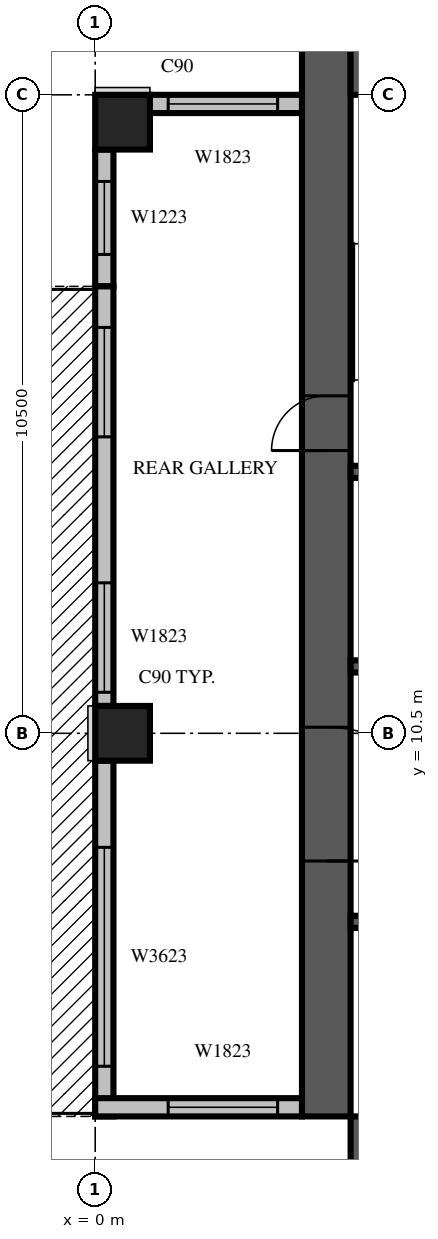
"""IFC4 building model, lengths in metres.
Left out: names, types, materials, properties, quantities, classifications, styles, units other than length and angle.
Written with IfcOpenShell. Run it as: python <this file> out.ifc"""

import sys

from ifc_helpers import new_model, si_unit, direction, frame, frame_2d, origin, origin_2d, place, context, subcontext, project, spatial, rectangle, extrude, source, transform, mapped, element, fill, save


model = new_model("IFC4")
c1 = context("Model", 3, precision=1e-05, world=origin(), true_north=direction((0.0, 1.0)))
c2 = subcontext(c1, "Body", "Model", "MODEL_VIEW")
j1 = project(units=[si_unit("LENGTHUNIT", "METRE"), si_unit("PLANEANGLEUNIT", "RADIAN")], contexts=[c1])
p1 = place(None, origin())
s1 = spatial("IfcSite", under=j1, at=p1, CompositionType="ELEMENT")
p2 = place(p1, origin())
s2 = spatial("IfcBuilding", under=s1, at=p2, CompositionType="ELEMENT")
p3 = place(p2, frame((0.0, 0.0, 193.0)))
s3 = spatial("IfcBuildingStorey", under=s2, at=p3, CompositionType="ELEMENT", Elevation=193.0)
m1 = source(origin(), c2, "Body", "SweptSolid", [
    extrude(rectangle(XDim=0.9, YDim=0.9, at=origin_2d()), origin(), (0.0, 0.0, 1.0), 3.8),
])
for number, where, z_axis, x_axis in (
    (1, (0.45, 10.5, 0.0), (0.0, 0.0, 1.0), (1.0, 0.0, 0.0)),
    (2, (0.45, 20.55, 0.0), (0.0, 0.0, 1.0), (1.0, 0.0, 0.0)),
):
    element("IfcColumn", number, at=place(p3, frame(where, z_axis=z_axis, x_axis=x_axis)), inside=s3, PredefinedType="COLUMN", context=c2, shape_type="MappedRepresentation", body=[
        mapped(m1, transform((0.0, 0.0, 0.0), scale=1.0)),
    ])
m2 = source(origin(), c2, "Body", "SweptSolid", [
    extrude(rectangle(XDim=17.6, YDim=0.8, at=frame_2d((8.8, 0.0))), origin(), (0.0, 0.0, 1.0), 3.8),
])
p4 = place(p3, frame((3.8, 4.2, 0.0), z_axis=(0.0, 0.0, 1.0), x_axis=(0.0, 1.0, 0.0)))
e3 = element("IfcWall", 3, at=p4, inside=s3, PredefinedType="SHEAR", context=c2, shape_type="MappedRepresentation", body=[
    mapped(m2, transform((0.0, 0.0, 0.0), scale=1.0)),
])
m3 = source(origin(), c2, "Body", "SweptSolid", [
    extrude(rectangle(XDim=2.2, YDim=2.1, at=frame_2d((1.1, 1.05))), frame((0.0, 0.41, 0.0), z_axis=(0.0, -1.0, 0.0), x_axis=(1.0, 0.0, 0.0)), (0.0, 0.0, 1.0), 0.82),
])
p5 = place(p4, frame((4.2, 0.0, 0.0)))
e4 = element("IfcOpeningElement", 4, at=p5, cuts=e3, PredefinedType="OPENING", context=c2, shape_type="MappedRepresentation", body=[
    mapped(m3, transform((0.0, 0.0, 0.0), scale=1.0)),
])
m4 = source(origin(), c2, "Body", "SweptSolid", [
    extrude(rectangle(XDim=0.9, YDim=2.1, at=frame_2d((0.45, 1.05))), frame((0.0, 0.41, 0.0), z_axis=(0.0, -1.0, 0.0), x_axis=(1.0, 0.0, 0.0)), (0.0, 0.0, 1.0), 0.82),
])
p6 = place(p4, frame((10.95, 0.0, 0.0)))
e5 = element("IfcOpeningElement", 5, at=p6, cuts=e3, PredefinedType="OPENING", context=c2, shape_type="MappedRepresentation", body=[
    mapped(m4, transform((0.0, 0.0, 0.0), scale=1.0)),
])
p7 = place(p3, frame((4.2, 3.8, 0.0), z_axis=(0.0, 0.0, 1.0), x_axis=(1.0, 0.0, 0.0)))
e6 = element("IfcWall", 6, at=p7, inside=s3, PredefinedType="SHEAR", context=c2, shape_type="MappedRepresentation", body=[
    mapped(m2, transform((0.0, 0.0, 0.0), scale=1.0)),
])
p8 = place(p7, frame((12.75, 0.0, 0.0)))
e7 = element("IfcOpeningElement", 7, at=p8, cuts=e6, PredefinedType="OPENING", context=c2, shape_type="MappedRepresentation", body=[
    mapped(m4, transform((0.0, 0.0, 0.0), scale=1.0)),
])
m5 = source(origin(), c2, "Body", "SweptSolid", [
    extrude(rectangle(XDim=16.8, YDim=0.8, at=frame_2d((8.4, 0.0))), origin(), (0.0, 0.0, 1.0), 3.8),
])
p9 = place(p3, frame((4.2, 21.4, 0.0), z_axis=(0.0, 0.0, 1.0), x_axis=(1.0, 0.0, 0.0)))
e8 = element("IfcWall", 8, at=p9, inside=s3, PredefinedType="SHEAR", context=c2, shape_type="MappedRepresentation", body=[
    mapped(m5, transform((0.0, 0.0, 0.0), scale=1.0)),
])
m6 = source(origin(), c2, "Body", "SweptSolid", [
    extrude(rectangle(XDim=1.2, YDim=2.1, at=frame_2d((0.6, 1.05))), frame((0.0, 0.41, 0.0), z_axis=(0.0, -1.0, 0.0), x_axis=(1.0, 0.0, 0.0)), (0.0, 0.0, 1.0), 0.82),
])
p10 = place(p9, frame((7.4, 0.0, 0.0)))
e9 = element("IfcOpeningElement", 9, at=p10, cuts=e8, PredefinedType="OPENING", context=c2, shape_type="MappedRepresentation", body=[
    mapped(m6, transform((0.0, 0.0, 0.0), scale=1.0)),
])
m7 = source(origin(), c2, "Body", "SweptSolid", [
    extrude(rectangle(XDim=2.5, YDim=0.3, at=frame_2d((1.25, 0.0))), origin(), (0.0, 0.0, 1.0), 3.4),
])
p11 = place(p3, frame((3.4, 20.85, 0.0), z_axis=(0.0, 0.0, 1.0), x_axis=(-1.0, 0.0, 0.0)))
e10 = element("IfcWall", 10, at=p11, inside=s3, PredefinedType="STANDARD", context=c2, shape_type="MappedRepresentation", body=[
    mapped(m7, transform((0.0, 0.0, 0.0), scale=1.0)),
])
m8 = source(origin(), c2, "Body", "SweptSolid", [
    extrude(rectangle(XDim=1.8, YDim=2.3, at=frame_2d((0.9, 1.15))), frame((0.0, 0.16, 0.0), z_axis=(0.0, -1.0, 0.0), x_axis=(1.0, 0.0, 0.0)), (0.0, 0.0, 1.0), 0.32),
])
p12 = place(p11, frame((0.4, 0.0, 0.6)))
e11 = element("IfcOpeningElement", 11, at=p12, cuts=e10, PredefinedType="OPENING", context=c2, shape_type="MappedRepresentation", body=[
    mapped(m8, transform((0.0, 0.0, 0.0), scale=1.0)),
])
m9 = source(origin(), c2, "Body", "SweptSolid", [
    extrude(rectangle(XDim=2.25, YDim=0.3, at=frame_2d((1.125, 0.0))), origin(), (0.0, 0.0, 1.0), 3.4),
])
p13 = place(p3, frame((0.15, 20.1, 0.0), z_axis=(0.0, 0.0, 1.0), x_axis=(0.0, -1.0, 0.0)))
e12 = element("IfcWall", 12, at=p13, inside=s3, PredefinedType="STANDARD", context=c2, shape_type="MappedRepresentation", body=[
    mapped(m9, transform((0.0, 0.0, 0.0), scale=1.0)),
])
m10 = source(origin(), c2, "Body", "SweptSolid", [
    extrude(rectangle(XDim=1.2, YDim=2.3, at=frame_2d((0.6, 1.15))), frame((0.0, 0.16, 0.0), z_axis=(0.0, -1.0, 0.0), x_axis=(1.0, 0.0, 0.0)), (0.0, 0.0, 1.0), 0.32),
])
p14 = place(p13, frame((0.525, 0.0, 0.6)))
e13 = element("IfcOpeningElement", 13, at=p14, cuts=e12, PredefinedType="OPENING", context=c2, shape_type="MappedRepresentation", body=[
    mapped(m10, transform((0.0, 0.0, 0.0), scale=1.0)),
])
m11 = source(origin(), c2, "Body", "SweptSolid", [
    extrude(rectangle(XDim=6.9, YDim=0.3, at=frame_2d((3.45, 0.0))), origin(), (0.0, 0.0, 1.0), 3.4),
])
p15 = place(p3, frame((0.15, 17.85, 0.0), z_axis=(0.0, 0.0, 1.0), x_axis=(0.0, -1.0, 0.0)))
e14 = element("IfcWall", 14, at=p15, inside=s3, PredefinedType="STANDARD", context=c2, shape_type="MappedRepresentation", body=[
    mapped(m11, transform((0.0, 0.0, 0.0), scale=1.0)),
])
m12 = source(origin(), c2, "Body", "SweptSolid", [
    extrude(rectangle(XDim=1.8, YDim=2.4, at=frame_2d((0.9, 1.2))), frame((0.0, 0.16, 0.0), z_axis=(0.0, -1.0, 0.0), x_axis=(1.0, 0.0, 0.0)), (0.0, 0.0, 1.0), 0.32),
])
p16 = place(p15, frame((0.675, 0.0, 0.0)))
e15 = element("IfcOpeningElement", 15, at=p16, cuts=e14, PredefinedType="OPENING", context=c2, shape_type="MappedRepresentation", body=[
    mapped(m12, transform((0.0, 0.0, 0.0), scale=1.0)),
])
p17 = place(p15, frame((4.875, 0.0, 0.6)))
e16 = element("IfcOpeningElement", 16, at=p17, cuts=e14, PredefinedType="OPENING", context=c2, shape_type="MappedRepresentation", body=[
    mapped(m8, transform((0.0, 0.0, 0.0), scale=1.0)),
])
m13 = source(origin(), c2, "Body", "SweptSolid", [
    extrude(rectangle(XDim=5.85, YDim=0.3, at=frame_2d((2.925, 0.0))), origin(), (0.0, 0.0, 1.0), 3.4),
])
p18 = place(p3, frame((0.15, 10.05, 0.0), z_axis=(0.0, 0.0, 1.0), x_axis=(0.0, -1.0, 0.0)))
e17 = element("IfcWall", 17, at=p18, inside=s3, PredefinedType="STANDARD", context=c2, shape_type="MappedRepresentation", body=[
    mapped(m13, transform((0.0, 0.0, 0.0), scale=1.0)),
])
m14 = source(origin(), c2, "Body", "SweptSolid", [
    extrude(rectangle(XDim=3.6, YDim=2.3, at=frame_2d((1.8, 1.15))), frame((0.0, 0.16, 0.0), z_axis=(0.0, -1.0, 0.0), x_axis=(1.0, 0.0, 0.0)), (0.0, 0.0, 1.0), 0.32),
])
p19 = place(p18, frame((1.425, 0.0, 0.6)))
e18 = element("IfcOpeningElement", 18, at=p19, cuts=e17, PredefinedType="OPENING", context=c2, shape_type="MappedRepresentation", body=[
    mapped(m14, transform((0.0, 0.0, 0.0), scale=1.0)),
])
m15 = source(origin(), c2, "Body", "SweptSolid", [
    extrude(rectangle(XDim=3.4, YDim=0.3, at=frame_2d((1.7, 0.0))), origin(), (0.0, 0.0, 1.0), 3.4),
])
p20 = place(p3, frame((0.0, 4.35, 0.0), z_axis=(0.0, 0.0, 1.0), x_axis=(1.0, 0.0, 0.0)))
e19 = element("IfcWall", 19, at=p20, inside=s3, PredefinedType="STANDARD", context=c2, shape_type="MappedRepresentation", body=[
    mapped(m15, transform((0.0, 0.0, 0.0), scale=1.0)),
])
p21 = place(p20, frame((1.2, 0.0, 0.6)))
e20 = element("IfcOpeningElement", 20, at=p21, cuts=e19, PredefinedType="OPENING", context=c2, shape_type="MappedRepresentation", body=[
    mapped(m8, transform((0.0, 0.0, 0.0), scale=1.0)),
])
m16 = source(origin(), c2, "Body", "SweptSolid", [
    extrude(rectangle(XDim=9.6, YDim=0.2, at=frame_2d((4.8, 0.0))), origin(), (0.0, 0.0, 1.0), 3.8),
])
p22 = place(p3, frame((4.2, 7.4, 0.0), z_axis=(0.0, 0.0, 1.0), x_axis=(1.0, 0.0, 0.0)))
e21 = element("IfcWall", 21, at=p22, inside=s3, PredefinedType="SOLIDWALL", context=c2, shape_type="MappedRepresentation", body=[
    mapped(m16, transform((0.0, 0.0, 0.0), scale=1.0)),
])
m17 = source(origin(), c2, "Body", "SweptSolid", [
    extrude(rectangle(XDim=1.1, YDim=2.1, at=frame_2d((0.55, 1.05))), frame((0.0, 0.11, 0.0), z_axis=(0.0, -1.0, 0.0), x_axis=(1.0, 0.0, 0.0)), (0.0, 0.0, 1.0), 0.22),
])
p23 = place(p22, frame((0.65, 0.0, 0.0)))
e22 = element("IfcOpeningElement", 22, at=p23, cuts=e21, PredefinedType="OPENING", context=c2, shape_type="MappedRepresentation", body=[
    mapped(m17, transform((0.0, 0.0, 0.0), scale=1.0)),
])
p24 = place(p22, frame((3.05, 0.0, 0.0)))
e23 = element("IfcOpeningElement", 23, at=p24, cuts=e21, PredefinedType="OPENING", context=c2, shape_type="MappedRepresentation", body=[
    mapped(m17, transform((0.0, 0.0, 0.0), scale=1.0)),
])
p25 = place(p22, frame((5.45, 0.0, 0.0)))
e24 = element("IfcOpeningElement", 24, at=p25, cuts=e21, PredefinedType="OPENING", context=c2, shape_type="MappedRepresentation", body=[
    mapped(m17, transform((0.0, 0.0, 0.0), scale=1.0)),
])
p26 = place(p22, frame((7.85, 0.0, 0.0)))
e25 = element("IfcOpeningElement", 25, at=p26, cuts=e21, PredefinedType="OPENING", context=c2, shape_type="MappedRepresentation", body=[
    mapped(m17, transform((0.0, 0.0, 0.0), scale=1.0)),
])
m18 = source(origin(), c2, "Body", "SweptSolid", [
    extrude(rectangle(XDim=4.8, YDim=0.2, at=frame_2d((2.4, 0.0))), origin(), (0.0, 0.0, 1.0), 3.8),
])
p27 = place(p3, frame((4.2, 11.6, 0.0), z_axis=(0.0, 0.0, 1.0), x_axis=(1.0, 0.0, 0.0)))
e26 = element("IfcWall", 26, at=p27, inside=s3, PredefinedType="SOLIDWALL", context=c2, shape_type="MappedRepresentation", body=[
    mapped(m18, transform((0.0, 0.0, 0.0), scale=1.0)),
])
p28 = place(p27, frame((0.65, 0.0, 0.0)))
e27 = element("IfcOpeningElement", 27, at=p28, cuts=e26, PredefinedType="OPENING", context=c2, shape_type="MappedRepresentation", body=[
    mapped(m17, transform((0.0, 0.0, 0.0), scale=1.0)),
])
p29 = place(p27, frame((3.05, 0.0, 0.0)))
e28 = element("IfcOpeningElement", 28, at=p29, cuts=e26, PredefinedType="OPENING", context=c2, shape_type="MappedRepresentation", body=[
    mapped(m17, transform((0.0, 0.0, 0.0), scale=1.0)),
])
p30 = place(p3, frame((4.2, 14.8, 0.0), z_axis=(0.0, 0.0, 1.0), x_axis=(1.0, 0.0, 0.0)))
e29 = element("IfcWall", 29, at=p30, inside=s3, PredefinedType="SOLIDWALL", context=c2, shape_type="MappedRepresentation", body=[
    mapped(m18, transform((0.0, 0.0, 0.0), scale=1.0)),
])
m19 = source(origin(), c2, "Body", "SweptSolid", [
    extrude(rectangle(XDim=1.8, YDim=2.3, at=frame_2d((0.9, 1.15))), frame((0.0, 0.03, 0.0), z_axis=(0.0, -1.0, 0.0), x_axis=(1.0, 0.0, 0.0)), (0.0, 0.0, 1.0), 0.06),
])
p31 = place(p12, origin())
e30 = element("IfcWindow", 30, at=p31, inside=s3, PartitioningType="SINGLE_PANEL", PredefinedType="WINDOW", context=c2, shape_type="MappedRepresentation", body=[
    mapped(m19, transform((0.0, 0.0, 0.0), scale=1.0)),
])
fill(e11, e30)
m20 = source(origin(), c2, "Body", "SweptSolid", [
    extrude(rectangle(XDim=1.2, YDim=2.3, at=frame_2d((0.6, 1.15))), frame((0.0, 0.03, 0.0), z_axis=(0.0, -1.0, 0.0), x_axis=(1.0, 0.0, 0.0)), (0.0, 0.0, 1.0), 0.06),
])
p32 = place(p14, origin())
e31 = element("IfcWindow", 31, at=p32, inside=s3, PartitioningType="SINGLE_PANEL", PredefinedType="WINDOW", context=c2, shape_type="MappedRepresentation", body=[
    mapped(m20, transform((0.0, 0.0, 0.0), scale=1.0)),
])
fill(e13, e31)
m21 = source(origin(), c2, "Body", "SweptSolid", [
    extrude(rectangle(XDim=1.8, YDim=2.4, at=frame_2d((0.9, 1.2))), frame((0.0, 0.025, 0.0), z_axis=(0.0, -1.0, 0.0), x_axis=(1.0, 0.0, 0.0)), (0.0, 0.0, 1.0), 0.05),
])
p33 = place(p16, origin())
e32 = element("IfcDoor", 32, at=p33, inside=s3, OperationType="SLIDING_TO_LEFT", PredefinedType="DOOR", context=c2, shape_type="MappedRepresentation", body=[
    mapped(m21, transform((0.0, 0.0, 0.0), scale=1.0)),
])
fill(e15, e32)
p34 = place(p17, origin())
e33 = element("IfcWindow", 33, at=p34, inside=s3, PartitioningType="SINGLE_PANEL", PredefinedType="WINDOW", context=c2, shape_type="MappedRepresentation", body=[
    mapped(m19, transform((0.0, 0.0, 0.0), scale=1.0)),
])
fill(e16, e33)
m22 = source(origin(), c2, "Body", "SweptSolid", [
    extrude(rectangle(XDim=3.6, YDim=2.3, at=frame_2d((1.8, 1.15))), frame((0.0, 0.03, 0.0), z_axis=(0.0, -1.0, 0.0), x_axis=(1.0, 0.0, 0.0)), (0.0, 0.0, 1.0), 0.06),
])
p35 = place(p19, origin())
e34 = element("IfcWindow", 34, at=p35, inside=s3, PartitioningType="SINGLE_PANEL", PredefinedType="WINDOW", context=c2, shape_type="MappedRepresentation", body=[
    mapped(m22, transform((0.0, 0.0, 0.0), scale=1.0)),
])
fill(e18, e34)
p36 = place(p21, origin())
e35 = element("IfcWindow", 35, at=p36, inside=s3, PartitioningType="SINGLE_PANEL", PredefinedType="WINDOW", context=c2, shape_type="MappedRepresentation", body=[
    mapped(m19, transform((0.0, 0.0, 0.0), scale=1.0)),
])
fill(e20, e35)
m23 = source(origin(), c2, "Body", "SweptSolid", [
    extrude(rectangle(XDim=2.2, YDim=2.1, at=frame_2d((1.1, 1.05))), frame((0.0, 0.025, 0.0), z_axis=(0.0, -1.0, 0.0), x_axis=(1.0, 0.0, 0.0)), (0.0, 0.0, 1.0), 0.05),
])
p37 = place(p5, origin())
e36 = element("IfcDoor", 36, at=p37, inside=s3, OperationType="DOUBLE_DOOR_SINGLE_SWING", PredefinedType="DOOR", context=c2, shape_type="MappedRepresentation", body=[
    mapped(m23, transform((0.0, 0.0, 0.0), scale=1.0)),
])
fill(e4, e36)
m24 = source(origin(), c2, "Body", "SweptSolid", [
    extrude(rectangle(XDim=0.9, YDim=2.1, at=frame_2d((0.45, 1.05))), frame((0.0, 0.025, 0.0), z_axis=(0.0, -1.0, 0.0), x_axis=(1.0, 0.0, 0.0)), (0.0, 0.0, 1.0), 0.05),
])
p38 = place(p6, origin())
e37 = element("IfcDoor", 37, at=p38, inside=s3, OperationType="SINGLE_SWING_LEFT", PredefinedType="DOOR", context=c2, shape_type="MappedRepresentation", body=[
    mapped(m24, transform((0.0, 0.0, 0.0), scale=1.0)),
])
fill(e5, e37)
save(model, sys.argv[1])
